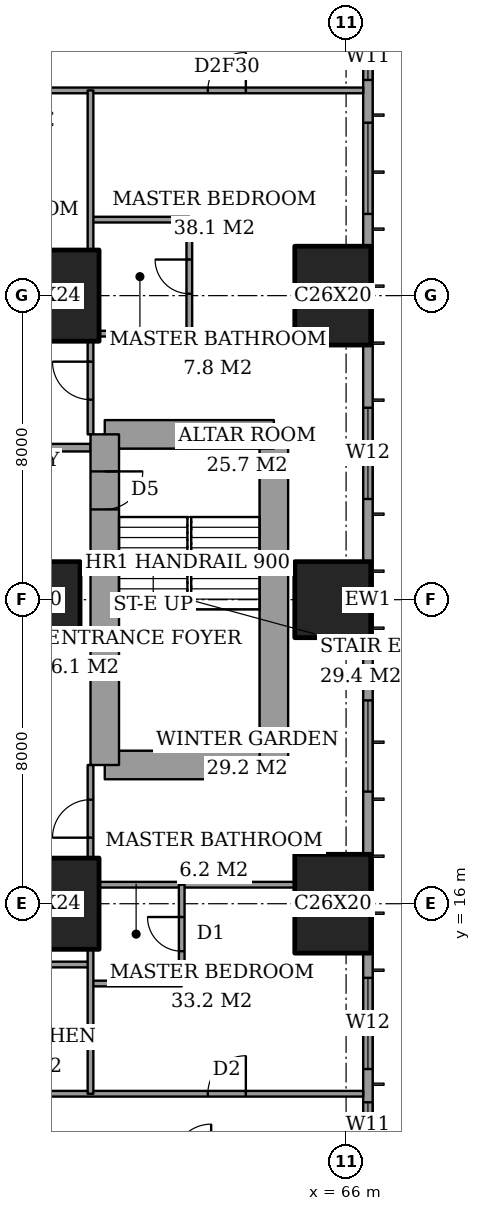
"""IFC4 building model, lengths in metres.
Left out: names, types, materials, properties, quantities, classifications, styles, units other than length and angle.
Written with IfcOpenShell. Run it as: python <this file> out.ifc"""

import sys

from ifc_helpers import new_model, si_unit, direction, frame, frame_2d, origin, origin_2d, place, context, subcontext, project, spatial, rectangle, extrude, element, fill, save


model = new_model("IFC4")
c1 = context("Model", 3, precision=1e-05, world=origin(), true_north=direction((0.0, 1.0)))
c2 = subcontext(c1, "Body", "Model", "MODEL_VIEW")
j1 = project(units=[si_unit("LENGTHUNIT", "METRE"), si_unit("PLANEANGLEUNIT", "RADIAN")], contexts=[c1])
p1 = place(None, origin())
s1 = spatial("IfcSite", under=j1, at=p1, CompositionType="ELEMENT")
p2 = place(p1, origin())
s2 = spatial("IfcBuilding", under=s1, at=p2, CompositionType="ELEMENT")
p3 = place(p2, frame((0.0, 0.0, 121.4)))
s3 = spatial("IfcBuildingStorey", under=s2, at=p3, CompositionType="ELEMENT", Elevation=121.4)
p4 = place(p3, frame((58.0, 16.0, 0.0), z_axis=(0.0, 0.0, 1.0), x_axis=(1.0, 0.0, 0.0)))
e1 = element("IfcColumn", 1, at=p4, inside=s3, PredefinedType="COLUMN", context=c2, shape_type="SweptSolid", body=[
    extrude(rectangle(XDim=3.0, YDim=2.4, at=origin_2d()), origin(), (0.0, 0.0, 1.0), 3.6),
])
p5 = place(p3, frame((58.0, 24.0, 0.0), z_axis=(0.0, 0.0, 1.0), x_axis=(1.0, 0.0, 0.0)))
e2 = element("IfcColumn", 2, at=p5, inside=s3, PredefinedType="COLUMN", context=c2, shape_type="SweptSolid", body=[
    extrude(rectangle(XDim=2.0, YDim=2.0, at=origin_2d()), origin(), (0.0, 0.0, 1.0), 3.6),
])
p6 = place(p3, frame((58.0, 32.0, 0.0), z_axis=(0.0, 0.0, 1.0), x_axis=(1.0, 0.0, 0.0)))
e3 = element("IfcColumn", 3, at=p6, inside=s3, PredefinedType="COLUMN", context=c2, shape_type="SweptSolid", body=[
    extrude(rectangle(XDim=3.0, YDim=2.4, at=origin_2d()), origin(), (0.0, 0.0, 1.0), 3.6),
])
p7 = place(p3, frame((65.65, 16.0, 0.0), z_axis=(0.0, 0.0, 1.0), x_axis=(0.0, 1.0, 0.0)))
e4 = element("IfcColumn", 4, at=p7, inside=s3, PredefinedType="COLUMN", context=c2, shape_type="SweptSolid", body=[
    extrude(rectangle(XDim=2.6, YDim=2.0, at=origin_2d()), origin(), (0.0, 0.0, 1.0), 3.6),
])
p8 = place(p3, frame((65.65, 24.0, 0.0), z_axis=(0.0, 0.0, 1.0), x_axis=(1.0, 0.0, 0.0)))
e5 = element("IfcColumn", 5, at=p8, inside=s3, PredefinedType="COLUMN", context=c2, shape_type="SweptSolid", body=[
    extrude(rectangle(XDim=2.0, YDim=2.0, at=origin_2d()), origin(), (0.0, 0.0, 1.0), 3.6),
])
p9 = place(p3, frame((65.65, 32.0, 0.0), z_axis=(0.0, 0.0, 1.0), x_axis=(0.0, 1.0, 0.0)))
e6 = element("IfcColumn", 6, at=p9, inside=s3, PredefinedType="COLUMN", context=c2, shape_type="SweptSolid", body=[
    extrude(rectangle(XDim=2.6, YDim=2.0, at=origin_2d()), origin(), (0.0, 0.0, 1.0), 3.6),
])
p10 = place(p3, frame((59.65, 19.65, 0.0), z_axis=(0.0, 0.0, 1.0), x_axis=(1.0, 0.0, 0.0)))
e7 = element("IfcWall", 7, at=p10, inside=s3, PredefinedType="SHEAR", context=c2, shape_type="SweptSolid", body=[
    extrude(rectangle(XDim=4.45, YDim=0.75, at=frame_2d((2.225, 0.0))), origin(), (0.0, 0.0, 1.0), 3.6),
])
p11 = place(p3, frame((64.1, 19.65, 0.0), z_axis=(0.0, 0.0, 1.0), x_axis=(0.0, 1.0, 0.0)))
e8 = element("IfcWall", 8, at=p11, inside=s3, PredefinedType="SHEAR", context=c2, shape_type="SweptSolid", body=[
    extrude(rectangle(XDim=8.7, YDim=0.75, at=frame_2d((4.35, 0.0))), origin(), (0.0, 0.0, 1.0), 3.6),
])
p12 = place(p3, frame((64.1, 28.35, 0.0), z_axis=(0.0, 0.0, 1.0), x_axis=(-1.0, 0.0, 0.0)))
e9 = element("IfcWall", 9, at=p12, inside=s3, PredefinedType="SHEAR", context=c2, shape_type="SweptSolid", body=[
    extrude(rectangle(XDim=4.45, YDim=0.75, at=frame_2d((2.225, 0.0))), origin(), (0.0, 0.0, 1.0), 3.6),
])
p13 = place(p3, frame((59.65, 28.35, 0.0), z_axis=(0.0, 0.0, 1.0), x_axis=(0.0, -1.0, 0.0)))
e10 = element("IfcWall", 10, at=p13, inside=s3, PredefinedType="SHEAR", context=c2, shape_type="SweptSolid", body=[
    extrude(rectangle(XDim=8.7, YDim=0.75, at=frame_2d((4.35, 0.0))), origin(), (0.0, 0.0, 1.0), 3.6),
])
p14 = place(p13, frame((0.975, 0.0, 0.0)))
e11 = element("IfcOpeningElement", 11, at=p14, cuts=e10, PredefinedType="OPENING", context=c2, shape_type="SweptSolid", body=[
    extrude(rectangle(XDim=1.0, YDim=2.1, at=frame_2d((0.5, 1.05))), frame((0.0, 0.385, 0.0), z_axis=(0.0, -1.0, 0.0), x_axis=(1.0, 0.0, 0.0)), (0.0, 0.0, 1.0), 0.77),
])
p15 = place(p3, frame((66.575, 3.175, 0.0), z_axis=(0.0, 0.0, 1.0), x_axis=(0.0, 1.0, 0.0)))
e12 = element("IfcWall", 12, at=p15, inside=s3, PredefinedType="SOLIDWALL", context=c2, shape_type="SweptSolid", body=[
    extrude(rectangle(XDim=41.65, YDim=0.25, at=frame_2d((20.825, 0.0))), origin(), (0.0, 0.0, 1.0), 3.6),
])
p16 = place(p15, frame((0.775, 0.0, 0.4)))
e13 = element("IfcOpeningElement", 13, at=p16, cuts=e12, PredefinedType="OPENING", context=c2, shape_type="SweptSolid", body=[
    extrude(rectangle(XDim=2.4, YDim=2.2, at=frame_2d((1.2, 1.1))), frame((0.0, 0.135, 0.0), z_axis=(0.0, -1.0, 0.0), x_axis=(1.0, 0.0, 0.0)), (0.0, 0.0, 1.0), 0.27),
])
p17 = place(p15, frame((6.4, 0.0, 0.4)))
e14 = element("IfcOpeningElement", 14, at=p17, cuts=e12, PredefinedType="OPENING", context=c2, shape_type="SweptSolid", body=[
    extrude(rectangle(XDim=1.2, YDim=2.2, at=frame_2d((0.6, 1.1))), frame((0.0, 0.135, 0.0), z_axis=(0.0, -1.0, 0.0), x_axis=(1.0, 0.0, 0.0)), (0.0, 0.0, 1.0), 0.27),
])
p18 = place(p15, frame((8.475, 0.0, 0.4)))
e15 = element("IfcOpeningElement", 15, at=p18, cuts=e12, PredefinedType="OPENING", context=c2, shape_type="SweptSolid", body=[
    extrude(rectangle(XDim=2.4, YDim=2.2, at=frame_2d((1.2, 1.1))), frame((0.0, 0.135, 0.0), z_axis=(0.0, -1.0, 0.0), x_axis=(1.0, 0.0, 0.0)), (0.0, 0.0, 1.0), 0.27),
])
p19 = place(p15, frame((15.775, 0.0, 0.4)))
e16 = element("IfcOpeningElement", 16, at=p19, cuts=e12, PredefinedType="OPENING", context=c2, shape_type="SweptSolid", body=[
    extrude(rectangle(XDim=2.4, YDim=2.2, at=frame_2d((1.2, 1.1))), frame((0.0, 0.135, 0.0), z_axis=(0.0, -1.0, 0.0), x_axis=(1.0, 0.0, 0.0)), (0.0, 0.0, 1.0), 0.27),
])
p20 = place(p15, frame((23.475, 0.0, 0.4)))
e17 = element("IfcOpeningElement", 17, at=p20, cuts=e12, PredefinedType="OPENING", context=c2, shape_type="SweptSolid", body=[
    extrude(rectangle(XDim=2.4, YDim=2.2, at=frame_2d((1.2, 1.1))), frame((0.0, 0.135, 0.0), z_axis=(0.0, -1.0, 0.0), x_axis=(1.0, 0.0, 0.0)), (0.0, 0.0, 1.0), 0.27),
])
p21 = place(p15, frame((30.975, 0.0, 0.4)))
e18 = element("IfcOpeningElement", 18, at=p21, cuts=e12, PredefinedType="OPENING", context=c2, shape_type="SweptSolid", body=[
    extrude(rectangle(XDim=2.4, YDim=2.2, at=frame_2d((1.2, 1.1))), frame((0.0, 0.135, 0.0), z_axis=(0.0, -1.0, 0.0), x_axis=(1.0, 0.0, 0.0)), (0.0, 0.0, 1.0), 0.27),
])
p22 = place(p15, frame((34.5, 0.0, 0.4)))
e19 = element("IfcOpeningElement", 19, at=p22, cuts=e12, PredefinedType="OPENING", context=c2, shape_type="SweptSolid", body=[
    extrude(rectangle(XDim=1.2, YDim=2.2, at=frame_2d((0.6, 1.1))), frame((0.0, 0.135, 0.0), z_axis=(0.0, -1.0, 0.0), x_axis=(1.0, 0.0, 0.0)), (0.0, 0.0, 1.0), 0.27),
])
p23 = place(p15, frame((38.475, 0.0, 0.4)))
e20 = element("IfcOpeningElement", 20, at=p23, cuts=e12, PredefinedType="OPENING", context=c2, shape_type="SweptSolid", body=[
    extrude(rectangle(XDim=2.4, YDim=2.2, at=frame_2d((1.2, 1.1))), frame((0.0, 0.135, 0.0), z_axis=(0.0, -1.0, 0.0), x_axis=(1.0, 0.0, 0.0)), (0.0, 0.0, 1.0), 0.27),
])
p24 = place(p3, frame((41.439, 11.0, 0.0), z_axis=(0.0, 0.0, 1.0), x_axis=(1.0, 0.0, 0.0)))
e21 = element("IfcWall", 21, at=p24, inside=s3, PredefinedType="PARTITIONING", context=c2, shape_type="SweptSolid", body=[
    extrude(rectangle(XDim=25.011, YDim=0.15, at=frame_2d((12.505, 0.0))), origin(), (0.0, 0.0, 1.0), 3.35),
])
p25 = place(p24, frame((12.561, 0.0, 0.0)))
e22 = element("IfcOpeningElement", 22, at=p25, cuts=e21, PredefinedType="OPENING", context=c2, shape_type="SweptSolid", body=[
    extrude(rectangle(XDim=1.0, YDim=2.1, at=frame_2d((0.5, 1.05))), frame((0.0, 0.085, 0.0), z_axis=(0.0, -1.0, 0.0), x_axis=(1.0, 0.0, 0.0)), (0.0, 0.0, 1.0), 0.17),
])
p26 = place(p24, frame((20.924, 0.0, 0.0)))
e23 = element("IfcOpeningElement", 23, at=p26, cuts=e21, PredefinedType="OPENING", context=c2, shape_type="SweptSolid", body=[
    extrude(rectangle(XDim=1.0, YDim=2.1, at=frame_2d((0.5, 1.05))), frame((0.0, 0.085, 0.0), z_axis=(0.0, -1.0, 0.0), x_axis=(1.0, 0.0, 0.0)), (0.0, 0.0, 1.0), 0.17),
])
p27 = place(p24, frame((15.499, 0.0, 0.0)))
e24 = element("IfcOpeningElement", 24, at=p27, cuts=e21, PredefinedType="OPENING", context=c2, shape_type="SweptSolid", body=[
    extrude(rectangle(XDim=1.0, YDim=2.1, at=frame_2d((0.5, 1.05))), frame((0.0, 0.085, 0.0), z_axis=(0.0, -1.0, 0.0), x_axis=(1.0, 0.0, 0.0)), (0.0, 0.0, 1.0), 0.17),
])
p28 = place(p24, frame((8.761, 0.0, 0.0)))
e25 = element("IfcOpeningElement", 25, at=p28, cuts=e21, PredefinedType="OPENING", context=c2, shape_type="SweptSolid", body=[
    extrude(rectangle(XDim=1.0, YDim=2.1, at=frame_2d((0.5, 1.05))), frame((0.0, 0.085, 0.0), z_axis=(0.0, -1.0, 0.0), x_axis=(1.0, 0.0, 0.0)), (0.0, 0.0, 1.0), 0.17),
])
p29 = place(p24, frame((2.836, 0.0, 0.0)))
e26 = element("IfcOpeningElement", 26, at=p29, cuts=e21, PredefinedType="OPENING", context=c2, shape_type="SweptSolid", body=[
    extrude(rectangle(XDim=1.0, YDim=2.1, at=frame_2d((0.5, 1.05))), frame((0.0, 0.085, 0.0), z_axis=(0.0, -1.0, 0.0), x_axis=(1.0, 0.0, 0.0)), (0.0, 0.0, 1.0), 0.17),
])
p30 = place(p3, frame((59.275, 13.9, 0.0), z_axis=(0.0, 0.0, 1.0), x_axis=(1.0, 0.0, 0.0)))
e27 = element("IfcWall", 27, at=p30, inside=s3, PredefinedType="PARTITIONING", context=c2, shape_type="SweptSolid", body=[
    extrude(rectangle(XDim=2.4, YDim=0.15, at=frame_2d((1.2, 0.0))), origin(), (0.0, 0.0, 1.0), 3.35),
])
p31 = place(p3, frame((55.6, 14.4, 0.0), z_axis=(0.0, 0.0, 1.0), x_axis=(1.0, 0.0, 0.0)))
e28 = element("IfcWall", 28, at=p31, inside=s3, PredefinedType="PARTITIONING", context=c2, shape_type="SweptSolid", body=[
    extrude(rectangle(XDim=3.675, YDim=0.15, at=frame_2d((1.837, 0.0))), origin(), (0.0, 0.0, 1.0), 3.35),
])
p32 = place(p3, frame((59.5, 16.5, 0.0), z_axis=(0.0, 0.0, 1.0), x_axis=(1.0, 0.0, 0.0)))
e29 = element("IfcWall", 29, at=p32, inside=s3, PredefinedType="PARTITIONING", context=c2, shape_type="SweptSolid", body=[
    extrude(rectangle(XDim=5.15, YDim=0.15, at=frame_2d((2.575, 0.0))), origin(), (0.0, 0.0, 1.0), 3.35),
])
p33 = place(p3, frame((42.0, 28.0, 0.0), z_axis=(0.0, 0.0, 1.0), x_axis=(1.0, 0.0, 0.0)))
e30 = element("IfcWall", 30, at=p33, inside=s3, PredefinedType="PARTITIONING", context=c2, shape_type="SweptSolid", body=[
    extrude(rectangle(XDim=17.275, YDim=0.2, at=frame_2d((8.637, 0.0))), origin(), (0.0, 0.0, 1.0), 3.35),
])
p34 = place(p33, frame((8.9, 0.0, 0.0)))
e31 = element("IfcOpeningElement", 31, at=p34, cuts=e30, PredefinedType="OPENING", context=c2, shape_type="SweptSolid", body=[
    extrude(rectangle(XDim=1.2, YDim=2.4, at=frame_2d((0.6, 1.2))), frame((0.0, 0.11, 0.0), z_axis=(0.0, -1.0, 0.0), x_axis=(1.0, 0.0, 0.0)), (0.0, 0.0, 1.0), 0.22),
])
p35 = place(p3, frame((59.5, 31.0, 0.0), z_axis=(0.0, 0.0, 1.0), x_axis=(1.0, 0.0, 0.0)))
e32 = element("IfcWall", 32, at=p35, inside=s3, PredefinedType="PARTITIONING", context=c2, shape_type="SweptSolid", body=[
    extrude(rectangle(XDim=5.15, YDim=0.15, at=frame_2d((2.575, 0.0))), origin(), (0.0, 0.0, 1.0), 3.35),
])
p36 = place(p3, frame((59.275, 34.0, 0.0), z_axis=(0.0, 0.0, 1.0), x_axis=(1.0, 0.0, 0.0)))
e33 = element("IfcWall", 33, at=p36, inside=s3, PredefinedType="PARTITIONING", context=c2, shape_type="SweptSolid", body=[
    extrude(rectangle(XDim=2.6, YDim=0.15, at=frame_2d((1.3, 0.0))), origin(), (0.0, 0.0, 1.0), 3.35),
])
p37 = place(p3, frame((41.439, 37.4, 0.0), z_axis=(0.0, 0.0, 1.0), x_axis=(1.0, 0.0, 0.0)))
e34 = element("IfcWall", 34, at=p37, inside=s3, PredefinedType="PARTITIONING", context=c2, shape_type="SweptSolid", body=[
    extrude(rectangle(XDim=25.011, YDim=0.15, at=frame_2d((12.505, 0.0))), origin(), (0.0, 0.0, 1.0), 3.35),
])
p38 = place(p37, frame((11.961, 0.0, 0.0)))
e35 = element("IfcOpeningElement", 35, at=p38, cuts=e34, PredefinedType="OPENING", context=c2, shape_type="SweptSolid", body=[
    extrude(rectangle(XDim=1.0, YDim=2.1, at=frame_2d((0.5, 1.05))), frame((0.0, 0.085, 0.0), z_axis=(0.0, -1.0, 0.0), x_axis=(1.0, 0.0, 0.0)), (0.0, 0.0, 1.0), 0.17),
])
p39 = place(p37, frame((20.924, 0.0, 0.0)))
e36 = element("IfcOpeningElement", 36, at=p39, cuts=e34, PredefinedType="OPENING", context=c2, shape_type="SweptSolid", body=[
    extrude(rectangle(XDim=1.0, YDim=2.1, at=frame_2d((0.5, 1.05))), frame((0.0, 0.085, 0.0), z_axis=(0.0, -1.0, 0.0), x_axis=(1.0, 0.0, 0.0)), (0.0, 0.0, 1.0), 0.17),
])
p40 = place(p37, frame((15.249, 0.0, 0.0)))
e37 = element("IfcOpeningElement", 37, at=p40, cuts=e34, PredefinedType="OPENING", context=c2, shape_type="SweptSolid", body=[
    extrude(rectangle(XDim=0.9, YDim=2.1, at=frame_2d((0.45, 1.05))), frame((0.0, 0.085, 0.0), z_axis=(0.0, -1.0, 0.0), x_axis=(1.0, 0.0, 0.0)), (0.0, 0.0, 1.0), 0.17),
])
p41 = place(p37, frame((9.561, 0.0, 0.0)))
e38 = element("IfcOpeningElement", 38, at=p41, cuts=e34, PredefinedType="OPENING", context=c2, shape_type="SweptSolid", body=[
    extrude(rectangle(XDim=1.0, YDim=2.1, at=frame_2d((0.5, 1.05))), frame((0.0, 0.085, 0.0), z_axis=(0.0, -1.0, 0.0), x_axis=(1.0, 0.0, 0.0)), (0.0, 0.0, 1.0), 0.17),
])
p42 = place(p37, frame((7.161, 0.0, 0.0)))
e39 = element("IfcOpeningElement", 39, at=p42, cuts=e34, PredefinedType="OPENING", context=c2, shape_type="SweptSolid", body=[
    extrude(rectangle(XDim=1.0, YDim=2.1, at=frame_2d((0.5, 1.05))), frame((0.0, 0.085, 0.0), z_axis=(0.0, -1.0, 0.0), x_axis=(1.0, 0.0, 0.0)), (0.0, 0.0, 1.0), 0.17),
])
p43 = place(p37, frame((2.836, 0.0, 0.0)))
e40 = element("IfcOpeningElement", 40, at=p43, cuts=e34, PredefinedType="OPENING", context=c2, shape_type="SweptSolid", body=[
    extrude(rectangle(XDim=1.0, YDim=2.1, at=frame_2d((0.5, 1.05))), frame((0.0, 0.085, 0.0), z_axis=(0.0, -1.0, 0.0), x_axis=(1.0, 0.0, 0.0)), (0.0, 0.0, 1.0), 0.17),
])
p44 = place(p3, frame((59.275, 11.0, 0.0), z_axis=(0.0, 0.0, 1.0), x_axis=(0.0, 1.0, 0.0)))
e41 = element("IfcWall", 41, at=p44, inside=s3, PredefinedType="PARTITIONING", context=c2, shape_type="SweptSolid", body=[
    extrude(rectangle(XDim=3.8, YDim=0.15, at=frame_2d((1.9, 0.0))), origin(), (0.0, 0.0, 1.0), 3.35),
])
p45 = place(p3, frame((59.275, 17.2, 0.0), z_axis=(0.0, 0.0, 1.0), x_axis=(0.0, 1.0, 0.0)))
e42 = element("IfcWall", 42, at=p45, inside=s3, PredefinedType="PARTITIONING", context=c2, shape_type="SweptSolid", body=[
    extrude(rectangle(XDim=2.45, YDim=0.15, at=frame_2d((1.225, 0.0))), origin(), (0.0, 0.0, 1.0), 3.35),
])
p46 = place(p45, frame((0.538, 0.0, 0.0)))
e43 = element("IfcOpeningElement", 43, at=p46, cuts=e42, PredefinedType="OPENING", context=c2, shape_type="SweptSolid", body=[
    extrude(rectangle(XDim=1.0, YDim=2.1, at=frame_2d((0.5, 1.05))), frame((0.0, 0.085, 0.0), z_axis=(0.0, -1.0, 0.0), x_axis=(1.0, 0.0, 0.0)), (0.0, 0.0, 1.0), 0.17),
])
p47 = place(p3, frame((59.275, 28.35, 0.0), z_axis=(0.0, 0.0, 1.0), x_axis=(0.0, 1.0, 0.0)))
e44 = element("IfcWall", 44, at=p47, inside=s3, PredefinedType="PARTITIONING", context=c2, shape_type="SweptSolid", body=[
    extrude(rectangle(XDim=2.45, YDim=0.15, at=frame_2d((1.225, 0.0))), origin(), (0.0, 0.0, 1.0), 3.35),
])
p48 = place(p47, frame((0.913, 0.0, 0.0)))
e45 = element("IfcOpeningElement", 45, at=p48, cuts=e44, PredefinedType="OPENING", context=c2, shape_type="SweptSolid", body=[
    extrude(rectangle(XDim=1.0, YDim=2.1, at=frame_2d((0.5, 1.05))), frame((0.0, 0.085, 0.0), z_axis=(0.0, -1.0, 0.0), x_axis=(1.0, 0.0, 0.0)), (0.0, 0.0, 1.0), 0.17),
])
p49 = place(p3, frame((59.275, 33.2, 0.0), z_axis=(0.0, 0.0, 1.0), x_axis=(0.0, 1.0, 0.0)))
e46 = element("IfcWall", 46, at=p49, inside=s3, PredefinedType="PARTITIONING", context=c2, shape_type="SweptSolid", body=[
    extrude(rectangle(XDim=4.2, YDim=0.15, at=frame_2d((2.1, 0.0))), origin(), (0.0, 0.0, 1.0), 3.35),
])
p50 = place(p3, frame((61.675, 13.9, 0.0), z_axis=(0.0, 0.0, 1.0), x_axis=(0.0, 1.0, 0.0)))
e47 = element("IfcWall", 47, at=p50, inside=s3, PredefinedType="PARTITIONING", context=c2, shape_type="SweptSolid", body=[
    extrude(rectangle(XDim=2.6, YDim=0.15, at=frame_2d((1.3, 0.0))), origin(), (0.0, 0.0, 1.0), 3.35),
])
p51 = place(p50, frame((0.85, 0.0, 0.0)))
e48 = element("IfcOpeningElement", 48, at=p51, cuts=e47, PredefinedType="OPENING", context=c2, shape_type="SweptSolid", body=[
    extrude(rectangle(XDim=0.9, YDim=2.1, at=frame_2d((0.45, 1.05))), frame((0.0, 0.085, 0.0), z_axis=(0.0, -1.0, 0.0), x_axis=(1.0, 0.0, 0.0)), (0.0, 0.0, 1.0), 0.17),
])
p52 = place(p3, frame((61.875, 31.0, 0.0), z_axis=(0.0, 0.0, 1.0), x_axis=(0.0, 1.0, 0.0)))
e49 = element("IfcWall", 49, at=p52, inside=s3, PredefinedType="PARTITIONING", context=c2, shape_type="SweptSolid", body=[
    extrude(rectangle(XDim=3.0, YDim=0.15, at=frame_2d((1.5, 0.0))), origin(), (0.0, 0.0, 1.0), 3.35),
])
p53 = place(p52, frame((1.05, 0.0, 0.0)))
e50 = element("IfcOpeningElement", 50, at=p53, cuts=e49, PredefinedType="OPENING", context=c2, shape_type="SweptSolid", body=[
    extrude(rectangle(XDim=0.9, YDim=2.1, at=frame_2d((0.45, 1.05))), frame((0.0, 0.085, 0.0), z_axis=(0.0, -1.0, 0.0), x_axis=(1.0, 0.0, 0.0)), (0.0, 0.0, 1.0), 0.17),
])
p54 = place(p17, origin())
e51 = element("IfcWindow", 51, at=p54, inside=s3, PartitioningType="SINGLE_PANEL", PredefinedType="WINDOW", context=c2, shape_type="SweptSolid", body=[
    extrude(rectangle(XDim=1.2, YDim=2.2, at=frame_2d((0.6, 1.1))), frame((0.0, 0.03, 0.0), z_axis=(0.0, -1.0, 0.0), x_axis=(1.0, 0.0, 0.0)), (0.0, 0.0, 1.0), 0.06),
])
fill(e14, e51)
p55 = place(p18, origin())
e52 = element("IfcWindow", 52, at=p55, inside=s3, PartitioningType="SINGLE_PANEL", PredefinedType="WINDOW", context=c2, shape_type="SweptSolid", body=[
    extrude(rectangle(XDim=2.4, YDim=2.2, at=frame_2d((1.2, 1.1))), frame((0.0, 0.03, 0.0), z_axis=(0.0, -1.0, 0.0), x_axis=(1.0, 0.0, 0.0)), (0.0, 0.0, 1.0), 0.06),
])
fill(e15, e52)
p56 = place(p19, origin())
e53 = element("IfcWindow", 53, at=p56, inside=s3, PartitioningType="SINGLE_PANEL", PredefinedType="WINDOW", context=c2, shape_type="SweptSolid", body=[
    extrude(rectangle(XDim=2.4, YDim=2.2, at=frame_2d((1.2, 1.1))), frame((0.0, 0.03, 0.0), z_axis=(0.0, -1.0, 0.0), x_axis=(1.0, 0.0, 0.0)), (0.0, 0.0, 1.0), 0.06),
])
fill(e16, e53)
p57 = place(p20, origin())
e54 = element("IfcWindow", 54, at=p57, inside=s3, PartitioningType="SINGLE_PANEL", PredefinedType="WINDOW", context=c2, shape_type="SweptSolid", body=[
    extrude(rectangle(XDim=2.4, YDim=2.2, at=frame_2d((1.2, 1.1))), frame((0.0, 0.03, 0.0), z_axis=(0.0, -1.0, 0.0), x_axis=(1.0, 0.0, 0.0)), (0.0, 0.0, 1.0), 0.06),
])
fill(e17, e54)
p58 = place(p21, origin())
e55 = element("IfcWindow", 55, at=p58, inside=s3, PartitioningType="SINGLE_PANEL", PredefinedType="WINDOW", context=c2, shape_type="SweptSolid", body=[
    extrude(rectangle(XDim=2.4, YDim=2.2, at=frame_2d((1.2, 1.1))), frame((0.0, 0.03, 0.0), z_axis=(0.0, -1.0, 0.0), x_axis=(1.0, 0.0, 0.0)), (0.0, 0.0, 1.0), 0.06),
])
fill(e18, e55)
p59 = place(p22, origin())
e56 = element("IfcWindow", 56, at=p59, inside=s3, PartitioningType="SINGLE_PANEL", PredefinedType="WINDOW", context=c2, shape_type="SweptSolid", body=[
    extrude(rectangle(XDim=1.2, YDim=2.2, at=frame_2d((0.6, 1.1))), frame((0.0, 0.03, 0.0), z_axis=(0.0, -1.0, 0.0), x_axis=(1.0, 0.0, 0.0)), (0.0, 0.0, 1.0), 0.06),
])
fill(e19, e56)
p60 = place(p51, origin())
e57 = element("IfcDoor", 57, at=p60, inside=s3, OperationType="SINGLE_SWING_LEFT", PredefinedType="DOOR", context=c2, shape_type="SweptSolid", body=[
    extrude(rectangle(XDim=0.9, YDim=2.1, at=frame_2d((0.45, 1.05))), frame((0.0, 0.025, 0.0), z_axis=(0.0, -1.0, 0.0), x_axis=(1.0, 0.0, 0.0)), (0.0, 0.0, 1.0), 0.05),
])
fill(e48, e57)
p61 = place(p26, origin())
e58 = element("IfcDoor", 58, at=p61, inside=s3, OperationType="SINGLE_SWING_LEFT", PredefinedType="DOOR", context=c2, shape_type="SweptSolid", body=[
    extrude(rectangle(XDim=1.0, YDim=2.1, at=frame_2d((0.5, 1.05))), frame((0.0, 0.025, 0.0), z_axis=(0.0, -1.0, 0.0), x_axis=(1.0, 0.0, 0.0)), (0.0, 0.0, 1.0), 0.05),
])
fill(e23, e58)
p62 = place(p46, origin())
e59 = element("IfcDoor", 59, at=p62, inside=s3, OperationType="SINGLE_SWING_RIGHT", PredefinedType="DOOR", context=c2, shape_type="SweptSolid", body=[
    extrude(rectangle(XDim=1.0, YDim=2.1, at=frame_2d((0.5, 1.05))), frame((0.0, 0.025, 0.0), z_axis=(0.0, -1.0, 0.0), x_axis=(1.0, 0.0, 0.0)), (0.0, 0.0, 1.0), 0.05),
])
fill(e43, e59)
p63 = place(p53, origin())
e60 = element("IfcDoor", 60, at=p63, inside=s3, OperationType="SINGLE_SWING_LEFT", PredefinedType="DOOR", context=c2, shape_type="SweptSolid", body=[
    extrude(rectangle(XDim=0.9, YDim=2.1, at=frame_2d((0.45, 1.05))), frame((0.0, 0.025, 0.0), z_axis=(0.0, -1.0, 0.0), x_axis=(1.0, 0.0, 0.0)), (0.0, 0.0, 1.0), 0.05),
])
fill(e50, e60)
p64 = place(p39, origin())
e61 = element("IfcDoor", 61, at=p64, inside=s3, OperationType="SINGLE_SWING_LEFT", PredefinedType="DOOR", context=c2, shape_type="SweptSolid", body=[
    extrude(rectangle(XDim=1.0, YDim=2.1, at=frame_2d((0.5, 1.05))), frame((0.0, 0.025, 0.0), z_axis=(0.0, -1.0, 0.0), x_axis=(1.0, 0.0, 0.0)), (0.0, 0.0, 1.0), 0.05),
])
fill(e36, e61)
p65 = place(p48, origin())
e62 = element("IfcDoor", 62, at=p65, inside=s3, OperationType="SINGLE_SWING_LEFT", PredefinedType="DOOR", context=c2, shape_type="SweptSolid", body=[
    extrude(rectangle(XDim=1.0, YDim=2.1, at=frame_2d((0.5, 1.05))), frame((0.0, 0.025, 0.0), z_axis=(0.0, -1.0, 0.0), x_axis=(1.0, 0.0, 0.0)), (0.0, 0.0, 1.0), 0.05),
])
fill(e45, e62)
p66 = place(p14, origin())
e63 = element("IfcDoor", 63, at=p66, inside=s3, OperationType="SINGLE_SWING_RIGHT", PredefinedType="DOOR", context=c2, shape_type="SweptSolid", body=[
    extrude(rectangle(XDim=1.0, YDim=2.1, at=frame_2d((0.5, 1.05))), frame((0.0, 0.025, 0.0), z_axis=(0.0, -1.0, 0.0), x_axis=(1.0, 0.0, 0.0)), (0.0, 0.0, 1.0), 0.05),
])
fill(e11, e63)
save(model, sys.argv[1])
